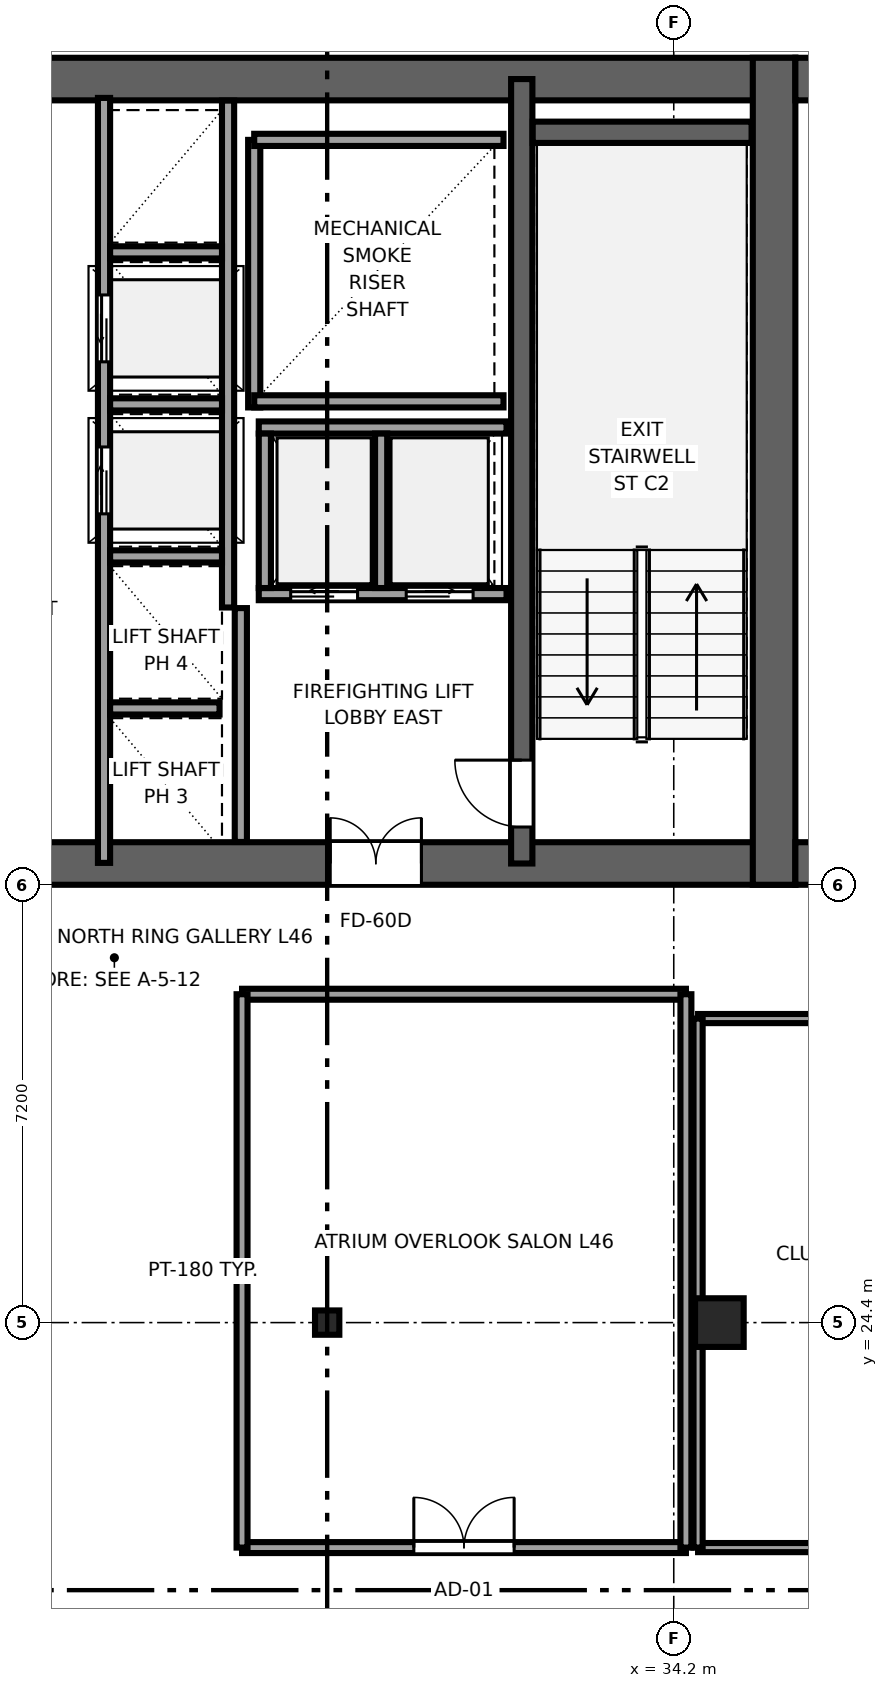
"""IFC4 building model, lengths in metres.
Left out: names, types, materials, properties, quantities, classifications, styles, units other than length and angle.
Written with IfcOpenShell. Run it as: python <this file> out.ifc"""

import sys

from ifc_helpers import new_model, si_unit, direction, frame, frame_2d, origin, origin_2d, place, context, subcontext, project, spatial, rectangle, i_section, extrude, source, transform, mapped, element, fill, save


model = new_model("IFC4")
c1 = context("Model", 3, precision=1e-05, world=origin(), true_north=direction((0.0, 1.0)))
c2 = subcontext(c1, "Body", "Model", "MODEL_VIEW")
j1 = project(units=[si_unit("LENGTHUNIT", "METRE"), si_unit("PLANEANGLEUNIT", "RADIAN")], contexts=[c1])
p1 = place(None, origin())
s1 = spatial("IfcSite", under=j1, at=p1, CompositionType="ELEMENT")
p2 = place(p1, origin())
s2 = spatial("IfcBuilding", under=s1, at=p2, CompositionType="ELEMENT")
p3 = place(p2, frame((0.0, 0.0, 175.45)))
s3 = spatial("IfcBuildingStorey", under=s2, at=p3, CompositionType="ELEMENT", Elevation=175.45)
p4 = place(p3, frame((9.8, 31.95, 0.0), z_axis=(0.0, 0.0, 1.0), x_axis=(1.0, 0.0, 0.0)))
e1 = element("IfcWall", 1, at=p4, inside=s3, PredefinedType="SHEAR", context=c2, shape_type="SweptSolid", body=[
    extrude(rectangle(XDim=26.4, YDim=0.7, at=frame_2d((13.2, 0.0))), origin(), (0.0, 0.0, 1.0), 3.55),
])
p5 = place(p4, frame((6.32, 0.0, 0.0), z_axis=(0.0, 0.0, 1.0), x_axis=(-1.0, 0.0, 0.0)))
e2 = element("IfcOpeningElement", 2, at=p5, cuts=e1, PredefinedType="OPENING", context=c2, shape_type="SweptSolid", body=[
    extrude(rectangle(XDim=1.5, YDim=2.04, at=frame_2d((0.75, 1.02))), frame((0.0, 0.36, 0.0), z_axis=(0.0, -1.0, 0.0), x_axis=(1.0, 0.0, 0.0)), (0.0, 0.0, 1.0), 0.72),
])
p6 = place(p4, frame((13.95, 0.0, 0.0), z_axis=(0.0, 0.0, 1.0), x_axis=(-1.0, 0.0, 0.0)))
e3 = element("IfcOpeningElement", 3, at=p6, cuts=e1, PredefinedType="OPENING", context=c2, shape_type="SweptSolid", body=[
    extrude(rectangle(XDim=1.5, YDim=2.04, at=frame_2d((0.75, 1.02))), frame((0.0, 0.36, 0.0), z_axis=(0.0, -1.0, 0.0), x_axis=(1.0, 0.0, 0.0)), (0.0, 0.0, 1.0), 0.72),
])
p7 = place(p4, frame((20.25, 0.0, 0.0), z_axis=(0.0, 0.0, 1.0), x_axis=(-1.0, 0.0, 0.0)))
e4 = element("IfcOpeningElement", 4, at=p7, cuts=e1, PredefinedType="OPENING", context=c2, shape_type="SweptSolid", body=[
    extrude(rectangle(XDim=1.5, YDim=2.04, at=frame_2d((0.75, 1.02))), frame((0.0, 0.36, 0.0), z_axis=(0.0, -1.0, 0.0), x_axis=(1.0, 0.0, 0.0)), (0.0, 0.0, 1.0), 0.72),
])
p8 = place(p4, frame((8.37, 0.0, 0.0), z_axis=(0.0, 0.0, 1.0), x_axis=(-1.0, 0.0, 0.0)))
e5 = element("IfcOpeningElement", 5, at=p8, cuts=e1, PredefinedType="OPENING", context=c2, shape_type="SweptSolid", body=[
    extrude(rectangle(XDim=0.82, YDim=2.01, at=frame_2d((0.41, 1.005))), frame((0.0, 0.36, 0.0), z_axis=(0.0, -1.0, 0.0), x_axis=(1.0, 0.0, 0.0)), (0.0, 0.0, 1.0), 0.72),
])
p9 = place(p3, frame((9.8, 44.85, 0.0), z_axis=(0.0, 0.0, 1.0), x_axis=(1.0, 0.0, 0.0)))
e6 = element("IfcWall", 6, at=p9, inside=s3, PredefinedType="SHEAR", context=c2, shape_type="SweptSolid", body=[
    extrude(rectangle(XDim=26.4, YDim=0.7, at=frame_2d((13.2, 0.0))), origin(), (0.0, 0.0, 1.0), 3.55),
])
p10 = place(p3, frame((35.85, 31.6, 0.0), z_axis=(0.0, 0.0, 1.0), x_axis=(0.0, 1.0, 0.0)))
e7 = element("IfcWall", 7, at=p10, inside=s3, PredefinedType="SHEAR", context=c2, shape_type="SweptSolid", body=[
    extrude(rectangle(XDim=13.6, YDim=0.7, at=frame_2d((6.8, 0.0))), origin(), (0.0, 0.0, 1.0), 3.55),
])
p11 = place(p3, frame((31.7, 31.95, 0.0), z_axis=(0.0, 0.0, 1.0), x_axis=(0.0, 1.0, 0.0)))
e8 = element("IfcWall", 8, at=p11, inside=s3, PredefinedType="SHEAR", context=c2, shape_type="SweptSolid", body=[
    extrude(rectangle(XDim=12.9, YDim=0.35, at=frame_2d((6.45, 0.0))), origin(), (0.0, 0.0, 1.0), 3.55),
])
p12 = place(p11, frame((1.7, 0.0, 0.0), z_axis=(0.0, 0.0, 1.0), x_axis=(-1.0, 0.0, 0.0)))
e9 = element("IfcOpeningElement", 9, at=p12, cuts=e8, PredefinedType="OPENING", context=c2, shape_type="SweptSolid", body=[
    extrude(rectangle(XDim=1.1, YDim=2.12, at=frame_2d((0.55, 1.06))), frame((0.0, 0.185, 0.0), z_axis=(0.0, -1.0, 0.0), x_axis=(1.0, 0.0, 0.0)), (0.0, 0.0, 1.0), 0.37),
])
p13 = place(p3, frame((36.2, 31.95, 0.0), z_axis=(0.0, 0.0, 1.0), x_axis=(1.0, 0.0, 0.0)))
e10 = element("IfcWall", 10, at=p13, inside=s3, PredefinedType="SHEAR", context=c2, shape_type="SweptSolid", body=[
    extrude(rectangle(XDim=4.2, YDim=0.7, at=frame_2d((2.1, 0.0))), origin(), (0.0, 0.0, 1.0), 3.55),
])
p14 = place(p13, frame((1.34, 0.0, 0.0), z_axis=(0.0, 0.0, 1.0), x_axis=(-1.0, 0.0, 0.0)))
e11 = element("IfcOpeningElement", 11, at=p14, cuts=e10, PredefinedType="OPENING", context=c2, shape_type="SweptSolid", body=[
    extrude(rectangle(XDim=1.02, YDim=2.03, at=frame_2d((0.51, 1.015))), frame((0.0, 0.36, 0.0), z_axis=(0.0, -1.0, 0.0), x_axis=(1.0, 0.0, 0.0)), (0.0, 0.0, 1.0), 0.72),
])
p15 = place(p3, frame((36.2, 44.85, 0.0), z_axis=(0.0, 0.0, 1.0), x_axis=(1.0, 0.0, 0.0)))
e12 = element("IfcWall", 12, at=p15, inside=s3, PredefinedType="SHEAR", context=c2, shape_type="SweptSolid", body=[
    extrude(rectangle(XDim=4.2, YDim=0.7, at=frame_2d((2.1, 0.0))), origin(), (0.0, 0.0, 1.0), 3.55),
])
p16 = place(p3, frame((31.88, 43.975, 0.0), z_axis=(0.0, 0.0, 1.0), x_axis=(1.0, 0.0, 0.0)))
e13 = element("IfcWall", 13, at=p16, inside=s3, PredefinedType="SHEAR", context=c2, shape_type="SweptSolid", body=[
    extrude(rectangle(XDim=3.6, YDim=0.35, at=frame_2d((1.8, 0.0))), origin(), (0.0, 0.0, 1.0), 3.55),
])
m1 = source(origin(), c2, "Body", "SweptSolid", [
    extrude(rectangle(XDim=0.8, YDim=0.8, at=origin_2d()), origin(), (0.0, 0.0, 1.0), 3.55),
])
p17 = place(p3, frame((34.95, 24.4, 0.0), z_axis=(0.0, 0.0, 1.0), x_axis=(1.0, 0.0, 0.0)))
e14 = element("IfcColumn", 14, at=p17, inside=s3, PredefinedType="COLUMN", context=c2, shape_type="MappedRepresentation", body=[
    mapped(m1, transform((0.0, 0.0, 0.0), x_axis=(1.0, 0.0, 0.0), y_axis=(0.0, 1.0, 0.0), z_axis=(0.0, 0.0, 1.0), scale=1.0)),
])
m2 = source(origin(), c2, "Body", "SweptSolid", [
    extrude(i_section(OverallWidth=0.4, OverallDepth=0.4, WebThickness=0.02, FlangeThickness=0.035, at=origin_2d()), origin(), (0.0, 0.0, 1.0), 3.55),
])
p18 = place(p3, frame((28.5, 24.4, 0.0), z_axis=(0.0, 0.0, 1.0), x_axis=(1.0, 0.0, 0.0)))
e15 = element("IfcColumn", 15, at=p18, inside=s3, PredefinedType="COLUMN", context=c2, shape_type="MappedRepresentation", body=[
    mapped(m2, transform((0.0, 0.0, 0.0), x_axis=(1.0, 0.0, 0.0), y_axis=(0.0, 1.0, 0.0), z_axis=(0.0, 0.0, 1.0), scale=1.0)),
])
p19 = place(p3, frame((27.3, 39.45, 0.0), z_axis=(0.0, 0.0, 1.0), x_axis=(0.0, 1.0, 0.0)))
e16 = element("IfcWall", 16, at=p19, inside=s3, PredefinedType="SOLIDWALL", context=c2, shape_type="SweptSolid", body=[
    extrude(rectangle(XDim=4.4, YDim=0.2, at=frame_2d((2.2, 0.0))), origin(), (0.0, 0.0, 1.0), 3.37),
])
for number, where, z_axis, x_axis in (
    (17, (27.3, 39.55, 0.0), (0.0, 0.0, 1.0), (1.0, 0.0, 0.0)),
    (18, (27.3, 43.85, 0.0), (0.0, 0.0, 1.0), (1.0, 0.0, 0.0)),
):
    element("IfcWall", number, at=place(p3, frame(where, z_axis=z_axis, x_axis=x_axis)), inside=s3, PredefinedType="SOLIDWALL", context=c2, shape_type="SweptSolid", body=[
        extrude(rectangle(XDim=4.1, YDim=0.2, at=frame_2d((2.05, 0.0))), origin(), (0.0, 0.0, 1.0), 3.37),
    ])
p20 = place(p3, frame((27.08, 32.304, 0.0), z_axis=(0.0, 0.0, 1.0), x_axis=(0.0, 1.0, 0.0)))
e19 = element("IfcWall", 19, at=p20, inside=s3, PredefinedType="SOLIDWALL", context=c2, shape_type="SweptSolid", body=[
    extrude(rectangle(XDim=3.846, YDim=0.2, at=frame_2d((1.923, 0.0))), origin(), (0.0, 0.0, 1.0), 3.37),
])
p21 = place(p3, frame((27.375, 36.38, 0.0), z_axis=(0.0, 0.0, 1.0), x_axis=(1.0, 0.0, 0.0)))
e20 = element("IfcWall", 20, at=p21, inside=s3, PredefinedType="SOLIDWALL", context=c2, shape_type="SweptSolid", body=[
    extrude(rectangle(XDim=4.075, YDim=0.2, at=frame_2d((2.038, 0.0))), origin(), (0.0, 0.0, 1.0), 3.37),
])
p22 = place(p21, frame((0.525, 0.0, 0.0)))
e21 = element("IfcOpeningElement", 21, at=p22, cuts=e20, PredefinedType="OPENING", context=c2, shape_type="SweptSolid", body=[
    extrude(rectangle(XDim=1.1, YDim=2.12, at=frame_2d((0.55, 1.06))), frame((0.0, 0.11, 0.0), z_axis=(0.0, -1.0, 0.0), x_axis=(1.0, 0.0, 0.0)), (0.0, 0.0, 1.0), 0.22),
])
p23 = place(p21, frame((2.425, 0.0, 0.0)))
e22 = element("IfcOpeningElement", 22, at=p23, cuts=e20, PredefinedType="OPENING", context=c2, shape_type="SweptSolid", body=[
    extrude(rectangle(XDim=1.1, YDim=2.12, at=frame_2d((0.55, 1.06))), frame((0.0, 0.11, 0.0), z_axis=(0.0, -1.0, 0.0), x_axis=(1.0, 0.0, 0.0)), (0.0, 0.0, 1.0), 0.22),
])
p24 = place(p3, frame((27.375, 39.12, 0.0), z_axis=(0.0, 0.0, 1.0), x_axis=(1.0, 0.0, 0.0)))
e23 = element("IfcWall", 23, at=p24, inside=s3, PredefinedType="SOLIDWALL", context=c2, shape_type="SweptSolid", body=[
    extrude(rectangle(XDim=4.075, YDim=0.2, at=frame_2d((2.038, 0.0))), origin(), (0.0, 0.0, 1.0), 3.37),
])
for number, where, z_axis, x_axis in (
    (24, (27.475, 36.48, 0.0), (0.0, 0.0, 1.0), (0.0, 1.0, 0.0)),
    (25, (29.387, 36.48, 0.0), (0.0, 0.0, 1.0), (0.0, 1.0, 0.0)),
):
    element("IfcWall", number, at=place(p3, frame(where, z_axis=z_axis, x_axis=x_axis)), inside=s3, PredefinedType="SOLIDWALL", context=c2, shape_type="SweptSolid", body=[
        extrude(rectangle(XDim=2.54, YDim=0.2, at=frame_2d((1.27, 0.0))), origin(), (0.0, 0.0, 1.0), 3.37),
    ])
p25 = place(p3, frame((24.83, 31.96, 0.0), z_axis=(0.0, 0.0, 1.0), x_axis=(0.0, 1.0, 0.0)))
e26 = element("IfcWall", 26, at=p25, inside=s3, PredefinedType="SOLIDWALL", context=c2, shape_type="SweptSolid", body=[
    extrude(rectangle(XDim=12.58, YDim=0.2, at=frame_2d((6.29, 0.0))), origin(), (0.0, 0.0, 1.0), 3.37),
])
p26 = place(p25, frame((5.74, 0.0, 0.0)))
e27 = element("IfcOpeningElement", 27, at=p26, cuts=e26, PredefinedType="OPENING", context=c2, shape_type="SweptSolid", body=[
    extrude(rectangle(XDim=1.1, YDim=2.12, at=frame_2d((0.55, 1.06))), frame((0.0, 0.11, 0.0), z_axis=(0.0, -1.0, 0.0), x_axis=(1.0, 0.0, 0.0)), (0.0, 0.0, 1.0), 0.22),
])
p27 = place(p25, frame((8.24, 0.0, 0.0)))
e28 = element("IfcOpeningElement", 28, at=p27, cuts=e26, PredefinedType="OPENING", context=c2, shape_type="SweptSolid", body=[
    extrude(rectangle(XDim=1.1, YDim=2.12, at=frame_2d((0.55, 1.06))), frame((0.0, 0.11, 0.0), z_axis=(0.0, -1.0, 0.0), x_axis=(1.0, 0.0, 0.0)), (0.0, 0.0, 1.0), 0.22),
])
p28 = place(p3, frame((26.87, 36.16, 0.0), z_axis=(0.0, 0.0, 1.0), x_axis=(0.0, 1.0, 0.0)))
e29 = element("IfcWall", 29, at=p28, inside=s3, PredefinedType="SOLIDWALL", context=c2, shape_type="SweptSolid", body=[
    extrude(rectangle(XDim=8.336, YDim=0.2, at=frame_2d((4.168, 0.0))), origin(), (0.0, 0.0, 1.0), 3.37),
])
p29 = place(p3, frame((24.93, 34.5, 0.0), z_axis=(0.0, 0.0, 1.0), x_axis=(1.0, 0.0, 0.0)))
e30 = element("IfcWall", 30, at=p29, inside=s3, PredefinedType="SOLIDWALL", context=c2, shape_type="SweptSolid", body=[
    extrude(rectangle(XDim=1.8, YDim=0.2, at=frame_2d((0.9, 0.0))), origin(), (0.0, 0.0, 1.0), 3.37),
])
for number, where, z_axis, x_axis in (
    (31, (24.93, 37.0, 0.0), (0.0, 0.0, 1.0), (1.0, 0.0, 0.0)),
    (32, (24.93, 39.5, 0.0), (0.0, 0.0, 1.0), (1.0, 0.0, 0.0)),
    (33, (24.93, 42.0, 0.0), (0.0, 0.0, 1.0), (1.0, 0.0, 0.0)),
):
    element("IfcWall", number, at=place(p3, frame(where, z_axis=z_axis, x_axis=x_axis)), inside=s3, PredefinedType="SOLIDWALL", context=c2, shape_type="SweptSolid", body=[
        extrude(rectangle(XDim=1.84, YDim=0.2, at=frame_2d((0.92, 0.0))), origin(), (0.0, 0.0, 1.0), 3.37),
    ])
p30 = place(p3, frame((27.1, 20.7, 0.0), z_axis=(0.0, 0.0, 1.0), x_axis=(1.0, 0.0, 0.0)))
e34 = element("IfcWall", 34, at=p30, inside=s3, PredefinedType="PARTITIONING", context=c2, shape_type="SweptSolid", body=[
    extrude(rectangle(XDim=7.3, YDim=0.18, at=frame_2d((3.65, 0.0))), origin(), (0.0, 0.0, 1.0), 3.37),
])
p31 = place(p30, frame((2.825, 0.0, 0.0)))
e35 = element("IfcOpeningElement", 35, at=p31, cuts=e34, PredefinedType="OPENING", context=c2, shape_type="SweptSolid", body=[
    extrude(rectangle(XDim=1.65, YDim=2.15, at=frame_2d((0.825, 1.075))), frame((0.0, 0.1, 0.0), z_axis=(0.0, -1.0, 0.0), x_axis=(1.0, 0.0, 0.0)), (0.0, 0.0, 1.0), 0.2),
])
p32 = place(p3, frame((27.1, 29.8, 0.0), z_axis=(0.0, 0.0, 1.0), x_axis=(1.0, 0.0, 0.0)))
e36 = element("IfcWall", 36, at=p32, inside=s3, PredefinedType="PARTITIONING", context=c2, shape_type="SweptSolid", body=[
    extrude(rectangle(XDim=7.3, YDim=0.18, at=frame_2d((3.65, 0.0))), origin(), (0.0, 0.0, 1.0), 3.37),
])
for number, where, z_axis, x_axis in (
    (37, (27.1, 20.7, 0.0), (0.0, 0.0, 1.0), (0.0, 1.0, 0.0)),
    (38, (34.4, 20.7, 0.0), (0.0, 0.0, 1.0), (0.0, 1.0, 0.0)),
):
    element("IfcWall", number, at=place(p3, frame(where, z_axis=z_axis, x_axis=x_axis)), inside=s3, PredefinedType="PARTITIONING", context=c2, shape_type="SweptSolid", body=[
        extrude(rectangle(XDim=9.1, YDim=0.18, at=frame_2d((4.55, 0.0))), origin(), (0.0, 0.0, 1.0), 3.37),
    ])
p33 = place(p3, frame((34.6, 20.7, 0.0), z_axis=(0.0, 0.0, 1.0), x_axis=(1.0, 0.0, 0.0)))
e39 = element("IfcWall", 39, at=p33, inside=s3, PredefinedType="PARTITIONING", context=c2, shape_type="SweptSolid", body=[
    extrude(rectangle(XDim=7.5, YDim=0.15, at=frame_2d((3.75, 0.0))), origin(), (0.0, 0.0, 1.0), 3.37),
])
p34 = place(p33, frame((2.925, 0.0, 0.0)))
e40 = element("IfcOpeningElement", 40, at=p34, cuts=e39, PredefinedType="OPENING", context=c2, shape_type="SweptSolid", body=[
    extrude(rectangle(XDim=1.65, YDim=2.15, at=frame_2d((0.825, 1.075))), frame((0.0, 0.085, 0.0), z_axis=(0.0, -1.0, 0.0), x_axis=(1.0, 0.0, 0.0)), (0.0, 0.0, 1.0), 0.17),
])
p35 = place(p3, frame((34.6, 29.4, 0.0), z_axis=(0.0, 0.0, 1.0), x_axis=(1.0, 0.0, 0.0)))
e41 = element("IfcWall", 41, at=p35, inside=s3, PredefinedType="PARTITIONING", context=c2, shape_type="SweptSolid", body=[
    extrude(rectangle(XDim=7.5, YDim=0.15, at=frame_2d((3.75, 0.0))), origin(), (0.0, 0.0, 1.0), 3.37),
])
p36 = place(p3, frame((34.6, 20.7, 0.0), z_axis=(0.0, 0.0, 1.0), x_axis=(0.0, 1.0, 0.0)))
e42 = element("IfcWall", 42, at=p36, inside=s3, PredefinedType="PARTITIONING", context=c2, shape_type="SweptSolid", body=[
    extrude(rectangle(XDim=8.7, YDim=0.15, at=frame_2d((4.35, 0.0))), origin(), (0.0, 0.0, 1.0), 3.37),
])
m3 = source(origin(), c2, "Body", "SweptSolid", [
    extrude(rectangle(XDim=1.1, YDim=2.12, at=frame_2d((0.55, 1.06))), frame((0.0, 0.025, 0.0), z_axis=(0.0, -1.0, 0.0), x_axis=(1.0, 0.0, 0.0)), (0.0, 0.0, 1.0), 0.05),
])
p37 = place(p12, origin())
e43 = element("IfcDoor", 43, at=p37, inside=s3, OperationType="SINGLE_SWING_RIGHT", PredefinedType="DOOR", context=c2, shape_type="MappedRepresentation", body=[
    mapped(m3, transform((0.0, 0.0, 0.0), x_axis=(1.0, 0.0, 0.0), y_axis=(0.0, 1.0, 0.0), z_axis=(0.0, 0.0, 1.0), scale=1.0)),
])
fill(e9, e43)
m4 = source(origin(), c2, "Body", "SweptSolid", [
    extrude(rectangle(XDim=1.5, YDim=2.04, at=frame_2d((0.75, 1.02))), frame((0.0, 0.025, 0.0), z_axis=(0.0, -1.0, 0.0), x_axis=(1.0, 0.0, 0.0)), (0.0, 0.0, 1.0), 0.05),
])
p38 = place(p7, origin())
e44 = element("IfcDoor", 44, at=p38, inside=s3, OperationType="DOUBLE_DOOR_SINGLE_SWING", PredefinedType="DOOR", context=c2, shape_type="MappedRepresentation", body=[
    mapped(m4, transform((0.0, 0.0, 0.0), x_axis=(1.0, 0.0, 0.0), y_axis=(0.0, 1.0, 0.0), z_axis=(0.0, 0.0, 1.0), scale=1.0)),
])
fill(e4, e44)
m5 = source(origin(), c2, "Body", "SweptSolid", [
    extrude(rectangle(XDim=1.1, YDim=2.12, at=frame_2d((0.55, 1.06))), frame((0.0, 0.025, 0.0), z_axis=(0.0, -1.0, 0.0), x_axis=(1.0, 0.0, 0.0)), (0.0, 0.0, 1.0), 0.05),
])
p39 = place(p22, origin())
e45 = element("IfcDoor", 45, at=p39, inside=s3, OperationType="SLIDING_TO_LEFT", PredefinedType="DOOR", context=c2, shape_type="MappedRepresentation", body=[
    mapped(m5, transform((0.0, 0.0, 0.0), x_axis=(1.0, 0.0, 0.0), y_axis=(0.0, 1.0, 0.0), z_axis=(0.0, 0.0, 1.0), scale=1.0)),
])
fill(e21, e45)
p40 = place(p23, origin())
e46 = element("IfcDoor", 46, at=p40, inside=s3, OperationType="SLIDING_TO_RIGHT", PredefinedType="DOOR", context=c2, shape_type="MappedRepresentation", body=[
    mapped(m5, transform((0.0, 0.0, 0.0), x_axis=(1.0, 0.0, 0.0), y_axis=(0.0, 1.0, 0.0), z_axis=(0.0, 0.0, 1.0), scale=1.0)),
])
fill(e22, e46)
p41 = place(p26, origin())
e47 = element("IfcDoor", 47, at=p41, inside=s3, OperationType="SLIDING_TO_RIGHT", PredefinedType="DOOR", context=c2, shape_type="MappedRepresentation", body=[
    mapped(m5, transform((0.0, 0.0, 0.0), x_axis=(1.0, 0.0, 0.0), y_axis=(0.0, 1.0, 0.0), z_axis=(0.0, 0.0, 1.0), scale=1.0)),
])
fill(e27, e47)
p42 = place(p27, origin())
e48 = element("IfcDoor", 48, at=p42, inside=s3, OperationType="SLIDING_TO_LEFT", PredefinedType="DOOR", context=c2, shape_type="MappedRepresentation", body=[
    mapped(m5, transform((0.0, 0.0, 0.0), x_axis=(1.0, 0.0, 0.0), y_axis=(0.0, 1.0, 0.0), z_axis=(0.0, 0.0, 1.0), scale=1.0)),
])
fill(e28, e48)
m6 = source(origin(), c2, "Body", "SweptSolid", [
    extrude(rectangle(XDim=1.65, YDim=2.15, at=frame_2d((0.825, 1.075))), frame((0.0, 0.025, 0.0), z_axis=(0.0, -1.0, 0.0), x_axis=(1.0, 0.0, 0.0)), (0.0, 0.0, 1.0), 0.05),
])
p43 = place(p31, origin())
e49 = element("IfcDoor", 49, at=p43, inside=s3, OperationType="DOUBLE_DOOR_SINGLE_SWING", PredefinedType="DOOR", context=c2, shape_type="MappedRepresentation", body=[
    mapped(m6, transform((0.0, 0.0, 0.0), x_axis=(1.0, 0.0, 0.0), y_axis=(0.0, 1.0, 0.0), z_axis=(0.0, 0.0, 1.0), scale=1.0)),
])
fill(e35, e49)
save(model, sys.argv[1])
